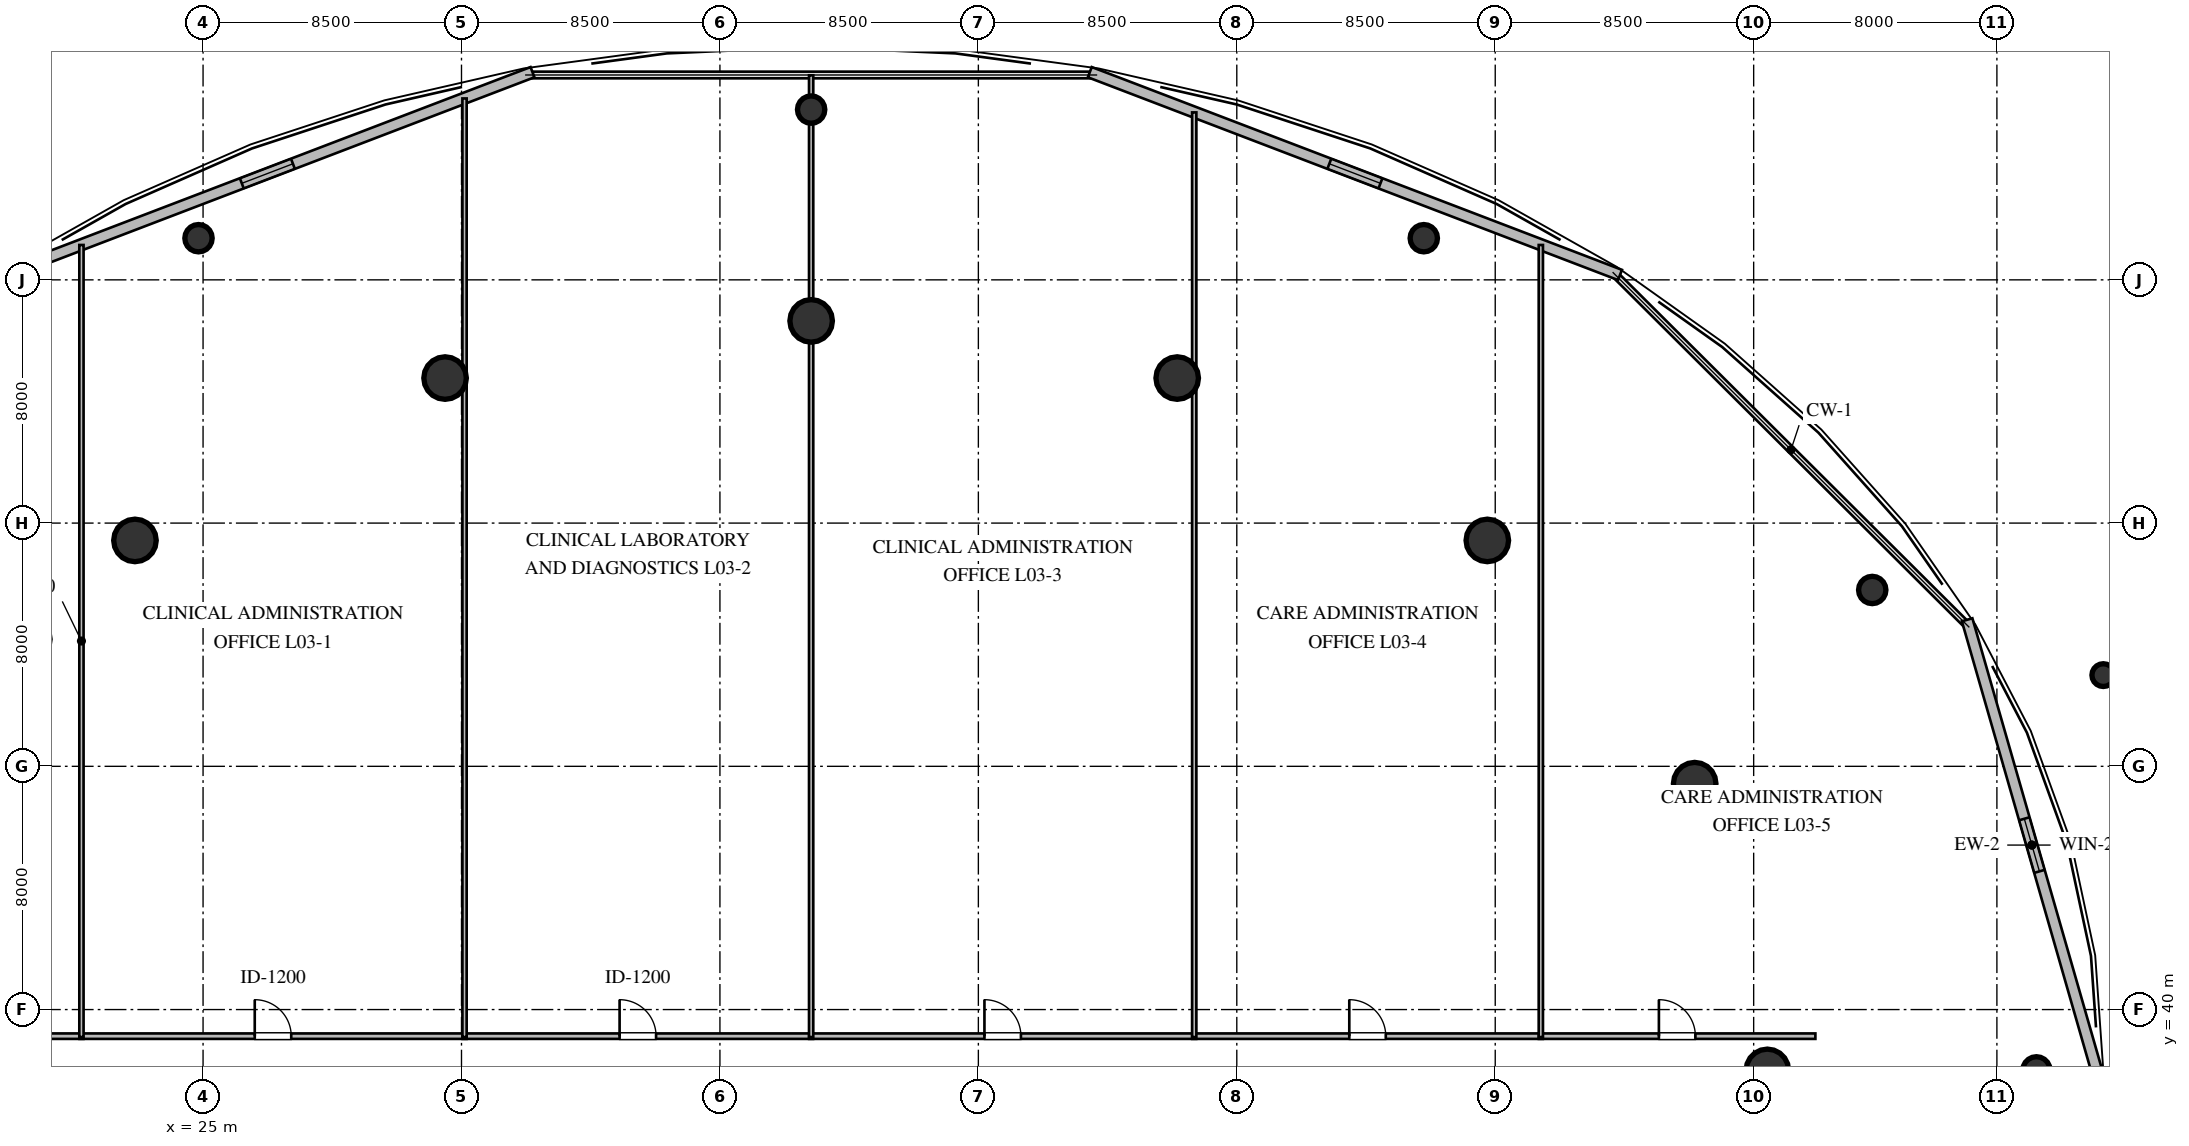
"""IFC4 building model, lengths in metres.
Left out: names, types, materials, properties, quantities, classifications, styles, units other than length and angle.
Written with IfcOpenShell. Run it as: python <this file> out.ifc"""

import sys

from ifc_helpers import new_model, si_unit, direction, frame, frame_2d, origin, origin_2d, place, context, subcontext, project, spatial, rectangle, circle, extrude, element, fill, save


model = new_model("IFC4")
c1 = context("Model", 3, precision=1e-05, world=origin(), true_north=direction((0.0, 1.0)))
c2 = subcontext(c1, "Body", "Model", "MODEL_VIEW")
j1 = project(units=[si_unit("LENGTHUNIT", "METRE"), si_unit("PLANEANGLEUNIT", "RADIAN")], contexts=[c1])
p1 = place(None, origin())
s1 = spatial("IfcSite", under=j1, at=p1, CompositionType="ELEMENT")
p2 = place(p1, origin())
s2 = spatial("IfcBuilding", under=s1, at=p2, CompositionType="ELEMENT")
p3 = place(p2, frame((0.0, 0.0, 14.4)))
s3 = spatial("IfcBuildingStorey", under=s2, at=p3, CompositionType="ELEMENT", Elevation=14.4)
for number, where, z_axis, x_axis in (
    (1, (76.45, 38.0, 0.0), (0.0, 0.0, 1.0), (1.0, 0.0, 0.0)),
    (2, (74.06, 47.43, 0.0), (0.0, 0.0, 1.0), (1.0, 0.0, 0.0)),
    (3, (67.24, 55.43, 0.0), (0.0, 0.0, 1.0), (1.0, 0.0, 0.0)),
    (4, (57.04, 60.77, 0.0), (0.0, 0.0, 1.0), (1.0, 0.0, 0.0)),
    (5, (45.0, 62.65, 0.0), (0.0, 0.0, 1.0), (1.0, 0.0, 0.0)),
    (6, (32.96, 60.77, 0.0), (0.0, 0.0, 1.0), (1.0, 0.0, 0.0)),
    (7, (22.76, 55.43, 0.0), (0.0, 0.0, 1.0), (1.0, 0.0, 0.0)),
):
    element("IfcColumn", number, at=place(p3, frame(where, z_axis=z_axis, x_axis=x_axis)), inside=s3, PredefinedType="COLUMN", context=c2, shape_type="SweptSolid", body=[
        extrude(circle(Radius=0.7, at=origin_2d()), origin(), (0.0, 0.0, 1.0), 4.8),
    ])
for number, where, z_axis, x_axis in (
    (8, (85.3, 38.0, 0.0), (0.0, 0.0, 1.0), (1.0, 0.0, 0.0)),
    (9, (79.9, 53.8, 0.0), (0.0, 0.0, 1.0), (1.0, 0.0, 0.0)),
    (10, (65.15, 65.37, 0.0), (0.0, 0.0, 1.0), (1.0, 0.0, 0.0)),
    (11, (45.0, 69.6, 0.0), (0.0, 0.0, 1.0), (1.0, 0.0, 0.0)),
    (12, (24.85, 65.37, 0.0), (0.0, 0.0, 1.0), (1.0, 0.0, 0.0)),
):
    element("IfcColumn", number, at=place(p3, frame(where, z_axis=z_axis, x_axis=x_axis)), inside=s3, PredefinedType="COLUMN", context=c2, shape_type="SweptSolid", body=[
        extrude(circle(Radius=0.45, at=origin_2d()), origin(), (0.0, 0.0, 1.0), 4.8),
    ])
p4 = place(p3, frame((87.5, 51.0, 0.0), z_axis=(0.0, 0.0, 1.0), x_axis=(1.0, 0.0, 0.0)))
e13 = element("IfcColumn", 13, at=p4, inside=s3, PredefinedType="COLUMN", context=c2, shape_type="SweptSolid", body=[
    extrude(circle(Radius=0.375, at=origin_2d()), origin(), (0.0, 0.0, 1.0), 4.8),
])
p5 = place(p3, frame((87.28, 38.0, 0.0), z_axis=(0.0, 0.0, 1.0), x_axis=(-0.276203409751, 0.961099202186, 0.0)))
e14 = element("IfcWall", 14, at=p5, inside=s3, PredefinedType="STANDARD", context=c2, shape_type="SweptSolid", body=[
    extrude(rectangle(XDim=15.42, YDim=0.36, at=frame_2d((7.71, 0.0))), origin(), (0.0, 0.0, 1.0), 4.52),
])
p6 = place(p5, frame((6.81, 0.0, 1.05)))
e15 = element("IfcOpeningElement", 15, at=p6, cuts=e14, PredefinedType="OPENING", context=c2, shape_type="SweptSolid", body=[
    extrude(rectangle(XDim=1.8, YDim=1.7, at=frame_2d((0.9, 0.85))), frame((0.0, 0.19, 0.0), z_axis=(0.0, -1.0, 0.0), x_axis=(1.0, 0.0, 0.0)), (0.0, 0.0, 1.0), 0.38),
])
p7 = place(p3, frame((71.604, 64.161, 0.0), z_axis=(0.0, 0.0, 1.0), x_axis=(-0.934010262022, 0.357246176238, 0.0)))
e16 = element("IfcWall", 16, at=p7, inside=s3, PredefinedType="STANDARD", context=c2, shape_type="SweptSolid", body=[
    extrude(rectangle(XDim=18.671, YDim=0.36, at=frame_2d((9.335, 0.0))), origin(), (0.0, 0.0, 1.0), 4.52),
])
p8 = place(p7, frame((8.436, 0.0, 1.05)))
e17 = element("IfcOpeningElement", 17, at=p8, cuts=e16, PredefinedType="OPENING", context=c2, shape_type="SweptSolid", body=[
    extrude(rectangle(XDim=1.8, YDim=1.7, at=frame_2d((0.9, 0.85))), frame((0.0, 0.19, 0.0), z_axis=(0.0, -1.0, 0.0), x_axis=(1.0, 0.0, 0.0)), (0.0, 0.0, 1.0), 0.38),
])
p9 = place(p3, frame((35.835, 70.831, 0.0), z_axis=(0.0, 0.0, 1.0), x_axis=(-0.934010262022, -0.357246176238, 0.0)))
e18 = element("IfcWall", 18, at=p9, inside=s3, PredefinedType="STANDARD", context=c2, shape_type="SweptSolid", body=[
    extrude(rectangle(XDim=18.671, YDim=0.36, at=frame_2d((9.335, 0.0))), origin(), (0.0, 0.0, 1.0), 4.52),
])
p10 = place(p9, frame((8.436, 0.0, 1.05)))
e19 = element("IfcOpeningElement", 19, at=p10, cuts=e18, PredefinedType="OPENING", context=c2, shape_type="SweptSolid", body=[
    extrude(rectangle(XDim=1.8, YDim=1.7, at=frame_2d((0.9, 0.85))), frame((0.0, 0.19, 0.0), z_axis=(0.0, -1.0, 0.0), x_axis=(1.0, 0.0, 0.0)), (0.0, 0.0, 1.0), 0.38),
])
p11 = place(p3, frame((13.97, 39.125, 0.0), z_axis=(0.0, 0.0, 1.0), x_axis=(1.0, 0.0, 0.0)))
e20 = element("IfcWall", 20, at=p11, inside=s3, PredefinedType="PARTITIONING", context=c2, shape_type="SweptSolid", body=[
    extrude(rectangle(XDim=7.095, YDim=0.18, at=frame_2d((3.547, 0.0))), origin(), (0.0, 0.0, 1.0), 4.52),
])
p12 = place(p11, frame((2.947, 0.0, 0.0)))
e21 = element("IfcOpeningElement", 21, at=p12, cuts=e20, PredefinedType="OPENING", context=c2, shape_type="SweptSolid", body=[
    extrude(rectangle(XDim=1.2, YDim=2.15, at=frame_2d((0.6, 1.075))), frame((0.0, 0.1, 0.0), z_axis=(0.0, -1.0, 0.0), x_axis=(1.0, 0.0, 0.0)), (0.0, 0.0, 1.0), 0.2),
])
p13 = place(p3, frame((20.935, 39.125, 0.0), z_axis=(0.0, 0.0, 1.0), x_axis=(1.0, 0.0, 0.0)))
e22 = element("IfcWall", 22, at=p13, inside=s3, PredefinedType="PARTITIONING", context=c2, shape_type="SweptSolid", body=[
    extrude(rectangle(XDim=12.73, YDim=0.18, at=frame_2d((6.365, 0.0))), origin(), (0.0, 0.0, 1.0), 4.52),
])
p14 = place(p13, frame((5.765, 0.0, 0.0)))
e23 = element("IfcOpeningElement", 23, at=p14, cuts=e22, PredefinedType="OPENING", context=c2, shape_type="SweptSolid", body=[
    extrude(rectangle(XDim=1.2, YDim=2.15, at=frame_2d((0.6, 1.075))), frame((0.0, 0.1, 0.0), z_axis=(0.0, -1.0, 0.0), x_axis=(1.0, 0.0, 0.0)), (0.0, 0.0, 1.0), 0.2),
])
p15 = place(p3, frame((33.535, 39.125, 0.0), z_axis=(0.0, 0.0, 1.0), x_axis=(1.0, 0.0, 0.0)))
e24 = element("IfcWall", 24, at=p15, inside=s3, PredefinedType="PARTITIONING", context=c2, shape_type="SweptSolid", body=[
    extrude(rectangle(XDim=11.53, YDim=0.18, at=frame_2d((5.765, 0.0))), origin(), (0.0, 0.0, 1.0), 4.52),
])
p16 = place(p15, frame((5.165, 0.0, 0.0)))
e25 = element("IfcOpeningElement", 25, at=p16, cuts=e24, PredefinedType="OPENING", context=c2, shape_type="SweptSolid", body=[
    extrude(rectangle(XDim=1.2, YDim=2.15, at=frame_2d((0.6, 1.075))), frame((0.0, 0.1, 0.0), z_axis=(0.0, -1.0, 0.0), x_axis=(1.0, 0.0, 0.0)), (0.0, 0.0, 1.0), 0.2),
])
p17 = place(p3, frame((44.935, 39.125, 0.0), z_axis=(0.0, 0.0, 1.0), x_axis=(1.0, 0.0, 0.0)))
e26 = element("IfcWall", 26, at=p17, inside=s3, PredefinedType="PARTITIONING", context=c2, shape_type="SweptSolid", body=[
    extrude(rectangle(XDim=12.73, YDim=0.18, at=frame_2d((6.365, 0.0))), origin(), (0.0, 0.0, 1.0), 4.52),
])
p18 = place(p17, frame((5.765, 0.0, 0.0)))
e27 = element("IfcOpeningElement", 27, at=p18, cuts=e26, PredefinedType="OPENING", context=c2, shape_type="SweptSolid", body=[
    extrude(rectangle(XDim=1.2, YDim=2.15, at=frame_2d((0.6, 1.075))), frame((0.0, 0.1, 0.0), z_axis=(0.0, -1.0, 0.0), x_axis=(1.0, 0.0, 0.0)), (0.0, 0.0, 1.0), 0.2),
])
p19 = place(p3, frame((57.535, 39.125, 0.0), z_axis=(0.0, 0.0, 1.0), x_axis=(1.0, 0.0, 0.0)))
e28 = element("IfcWall", 28, at=p19, inside=s3, PredefinedType="PARTITIONING", context=c2, shape_type="SweptSolid", body=[
    extrude(rectangle(XDim=11.53, YDim=0.18, at=frame_2d((5.765, 0.0))), origin(), (0.0, 0.0, 1.0), 4.52),
])
p20 = place(p19, frame((5.165, 0.0, 0.0)))
e29 = element("IfcOpeningElement", 29, at=p20, cuts=e28, PredefinedType="OPENING", context=c2, shape_type="SweptSolid", body=[
    extrude(rectangle(XDim=1.2, YDim=2.15, at=frame_2d((0.6, 1.075))), frame((0.0, 0.1, 0.0), z_axis=(0.0, -1.0, 0.0), x_axis=(1.0, 0.0, 0.0)), (0.0, 0.0, 1.0), 0.2),
])
p21 = place(p3, frame((68.935, 39.125, 0.0), z_axis=(0.0, 0.0, 1.0), x_axis=(1.0, 0.0, 0.0)))
e30 = element("IfcWall", 30, at=p21, inside=s3, PredefinedType="PARTITIONING", context=c2, shape_type="SweptSolid", body=[
    extrude(rectangle(XDim=9.095, YDim=0.18, at=frame_2d((4.547, 0.0))), origin(), (0.0, 0.0, 1.0), 4.52),
])
p22 = place(p21, frame((3.948, 0.0, 0.0)))
e31 = element("IfcOpeningElement", 31, at=p22, cuts=e30, PredefinedType="OPENING", context=c2, shape_type="SweptSolid", body=[
    extrude(rectangle(XDim=1.2, YDim=2.15, at=frame_2d((0.6, 1.075))), frame((0.0, 0.1, 0.0), z_axis=(0.0, -1.0, 0.0), x_axis=(1.0, 0.0, 0.0)), (0.0, 0.0, 1.0), 0.2),
])
p23 = place(p3, frame((21.0, 65.147, 0.0), z_axis=(0.0, 0.0, 1.0), x_axis=(0.0, -1.0, 0.0)))
e32 = element("IfcWall", 32, at=p23, inside=s3, PredefinedType="PARTITIONING", context=c2, shape_type="SweptSolid", body=[
    extrude(rectangle(XDim=26.052, YDim=0.14, at=frame_2d((13.026, 0.0))), origin(), (0.0, 0.0, 1.0), 4.05),
])
p24 = place(p3, frame((33.6, 69.966, 0.0), z_axis=(0.0, 0.0, 1.0), x_axis=(0.0, -1.0, 0.0)))
e33 = element("IfcWall", 33, at=p24, inside=s3, PredefinedType="PARTITIONING", context=c2, shape_type="SweptSolid", body=[
    extrude(rectangle(XDim=30.871, YDim=0.14, at=frame_2d((15.436, 0.0))), origin(), (0.0, 0.0, 1.0), 4.05),
])
p25 = place(p3, frame((45.0, 70.728, 0.0), z_axis=(0.0, 0.0, 1.0), x_axis=(0.0, -1.0, 0.0)))
e34 = element("IfcWall", 34, at=p25, inside=s3, PredefinedType="PARTITIONING", context=c2, shape_type="SweptSolid", body=[
    extrude(rectangle(XDim=31.633, YDim=0.14, at=frame_2d((15.816, 0.0))), origin(), (0.0, 0.0, 1.0), 3.01),
])
p26 = place(p3, frame((57.6, 69.507, 0.0), z_axis=(0.0, 0.0, 1.0), x_axis=(0.0, -1.0, 0.0)))
e35 = element("IfcWall", 35, at=p26, inside=s3, PredefinedType="PARTITIONING", context=c2, shape_type="SweptSolid", body=[
    extrude(rectangle(XDim=30.412, YDim=0.14, at=frame_2d((15.206, 0.0))), origin(), (0.0, 0.0, 1.0), 4.52),
])
p27 = place(p3, frame((69.0, 65.147, 0.0), z_axis=(0.0, 0.0, 1.0), x_axis=(0.0, -1.0, 0.0)))
e36 = element("IfcWall", 36, at=p27, inside=s3, PredefinedType="PARTITIONING", context=c2, shape_type="SweptSolid", body=[
    extrude(rectangle(XDim=26.052, YDim=0.14, at=frame_2d((13.026, 0.0))), origin(), (0.0, 0.0, 1.0), 4.52),
])
p28 = place(p6, origin())
e37 = element("IfcWindow", 37, at=p28, inside=s3, PartitioningType="SINGLE_PANEL", PredefinedType="WINDOW", context=c2, shape_type="SweptSolid", body=[
    extrude(rectangle(XDim=1.8, YDim=1.7, at=frame_2d((0.9, 0.85))), frame((0.0, 0.03, 0.0), z_axis=(0.0, -1.0, 0.0), x_axis=(1.0, 0.0, 0.0)), (0.0, 0.0, 1.0), 0.06),
])
fill(e15, e37)
p29 = place(p8, origin())
e38 = element("IfcWindow", 38, at=p29, inside=s3, PartitioningType="SINGLE_PANEL", PredefinedType="WINDOW", context=c2, shape_type="SweptSolid", body=[
    extrude(rectangle(XDim=1.8, YDim=1.7, at=frame_2d((0.9, 0.85))), frame((0.0, 0.03, 0.0), z_axis=(0.0, -1.0, 0.0), x_axis=(1.0, 0.0, 0.0)), (0.0, 0.0, 1.0), 0.06),
])
fill(e17, e38)
p30 = place(p10, origin())
e39 = element("IfcWindow", 39, at=p30, inside=s3, PartitioningType="SINGLE_PANEL", PredefinedType="WINDOW", context=c2, shape_type="SweptSolid", body=[
    extrude(rectangle(XDim=1.8, YDim=1.7, at=frame_2d((0.9, 0.85))), frame((0.0, 0.03, 0.0), z_axis=(0.0, -1.0, 0.0), x_axis=(1.0, 0.0, 0.0)), (0.0, 0.0, 1.0), 0.06),
])
fill(e19, e39)
p31 = place(p14, origin())
e40 = element("IfcDoor", 40, at=p31, inside=s3, OperationType="SINGLE_SWING_LEFT", PredefinedType="DOOR", context=c2, shape_type="SweptSolid", body=[
    extrude(rectangle(XDim=1.2, YDim=2.15, at=frame_2d((0.6, 1.075))), frame((0.0, 0.025, 0.0), z_axis=(0.0, -1.0, 0.0), x_axis=(1.0, 0.0, 0.0)), (0.0, 0.0, 1.0), 0.05),
])
fill(e23, e40)
p32 = place(p16, origin())
e41 = element("IfcDoor", 41, at=p32, inside=s3, OperationType="SINGLE_SWING_LEFT", PredefinedType="DOOR", context=c2, shape_type="SweptSolid", body=[
    extrude(rectangle(XDim=1.2, YDim=2.15, at=frame_2d((0.6, 1.075))), frame((0.0, 0.025, 0.0), z_axis=(0.0, -1.0, 0.0), x_axis=(1.0, 0.0, 0.0)), (0.0, 0.0, 1.0), 0.05),
])
fill(e25, e41)
p33 = place(p18, origin())
e42 = element("IfcDoor", 42, at=p33, inside=s3, OperationType="SINGLE_SWING_LEFT", PredefinedType="DOOR", context=c2, shape_type="SweptSolid", body=[
    extrude(rectangle(XDim=1.2, YDim=2.15, at=frame_2d((0.6, 1.075))), frame((0.0, 0.025, 0.0), z_axis=(0.0, -1.0, 0.0), x_axis=(1.0, 0.0, 0.0)), (0.0, 0.0, 1.0), 0.05),
])
fill(e27, e42)
p34 = place(p20, origin())
e43 = element("IfcDoor", 43, at=p34, inside=s3, OperationType="SINGLE_SWING_LEFT", PredefinedType="DOOR", context=c2, shape_type="SweptSolid", body=[
    extrude(rectangle(XDim=1.2, YDim=2.15, at=frame_2d((0.6, 1.075))), frame((0.0, 0.025, 0.0), z_axis=(0.0, -1.0, 0.0), x_axis=(1.0, 0.0, 0.0)), (0.0, 0.0, 1.0), 0.05),
])
fill(e29, e43)
p35 = place(p22, origin())
e44 = element("IfcDoor", 44, at=p35, inside=s3, OperationType="SINGLE_SWING_LEFT", PredefinedType="DOOR", context=c2, shape_type="SweptSolid", body=[
    extrude(rectangle(XDim=1.2, YDim=2.15, at=frame_2d((0.6, 1.075))), frame((0.0, 0.025, 0.0), z_axis=(0.0, -1.0, 0.0), x_axis=(1.0, 0.0, 0.0)), (0.0, 0.0, 1.0), 0.05),
])
fill(e31, e44)
save(model, sys.argv[1])
